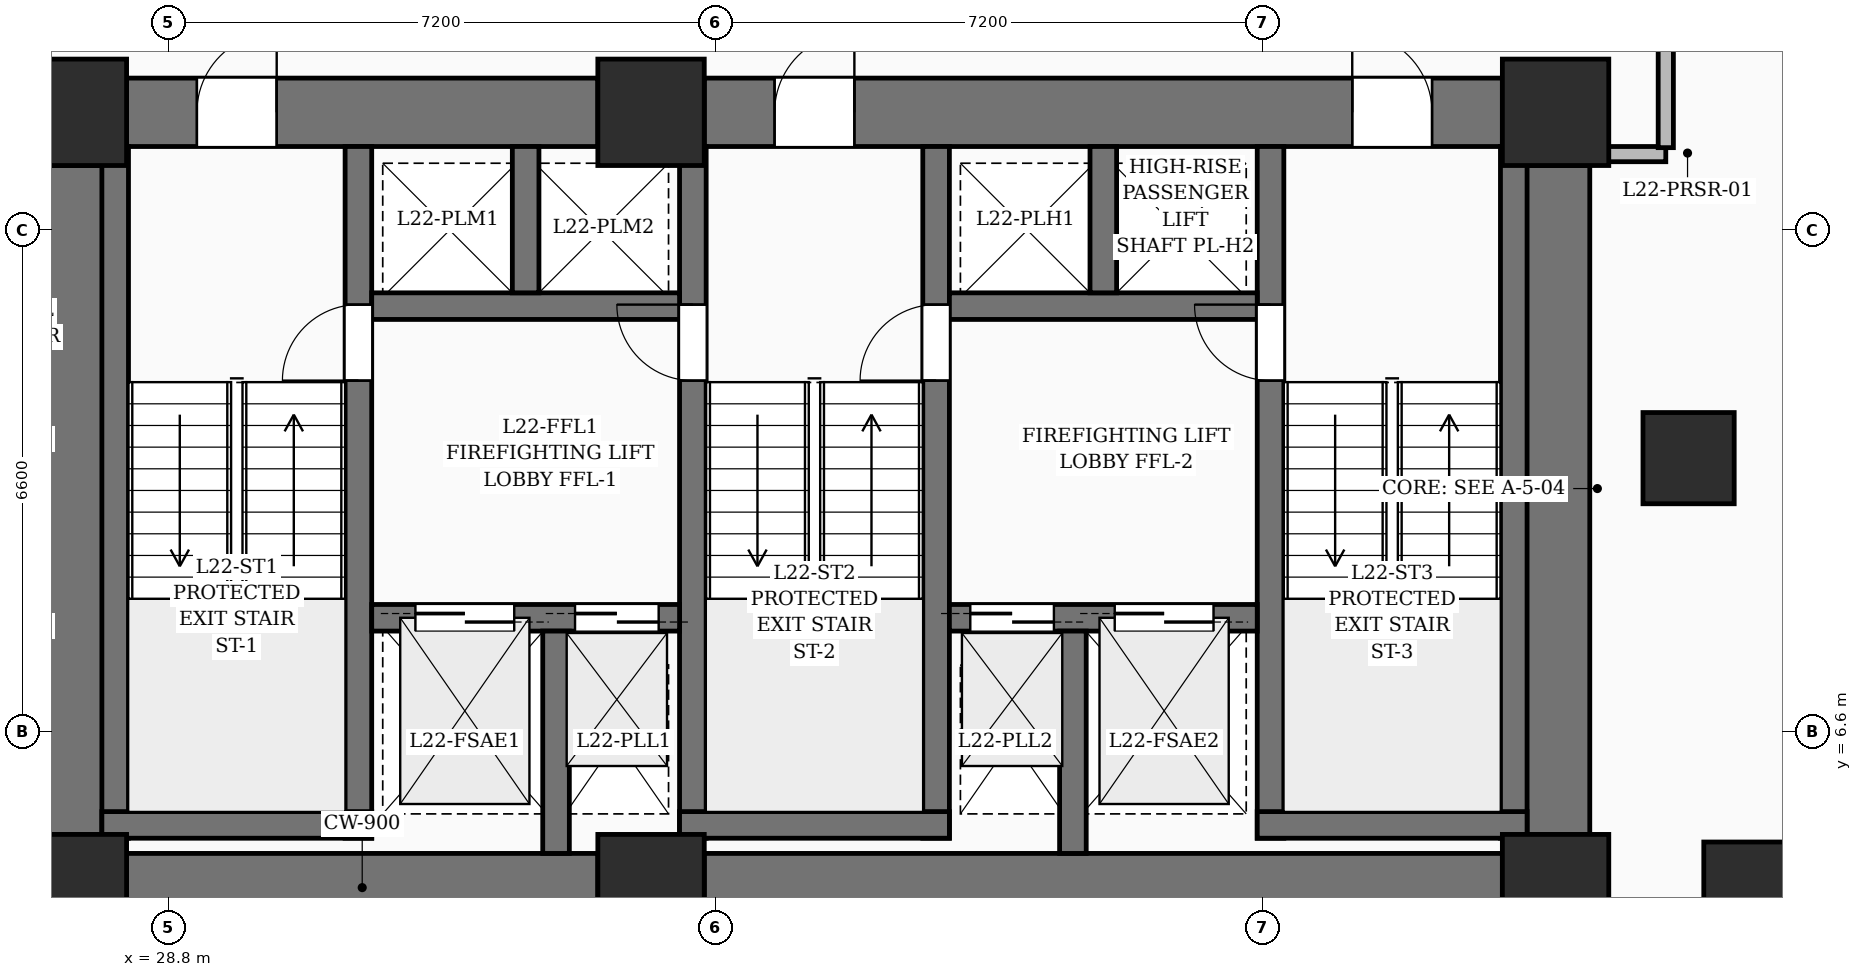
"""IFC4 building model, lengths in metres.
Left out: names, types, materials, properties, quantities, classifications, styles, units other than length and angle.
Written with IfcOpenShell. Run it as: python <this file> out.ifc"""

import sys

from ifc_helpers import new_model, si_unit, direction, frame, frame_2d, origin, origin_2d, place, context, subcontext, project, spatial, rectangle, extrude, element, fill, save


model = new_model("IFC4")
c1 = context("Model", 3, precision=1e-05, world=origin(), true_north=direction((0.0, 1.0)))
c2 = subcontext(c1, "Body", "Model", "MODEL_VIEW")
j1 = project(units=[si_unit("LENGTHUNIT", "METRE"), si_unit("PLANEANGLEUNIT", "RADIAN")], contexts=[c1])
p1 = place(None, origin())
s1 = spatial("IfcSite", under=j1, at=p1, CompositionType="ELEMENT")
p2 = place(p1, origin())
s2 = spatial("IfcBuilding", under=s1, at=p2, CompositionType="ELEMENT")
p3 = place(p2, frame((0.0, 0.0, 89.4)))
s3 = spatial("IfcBuildingStorey", under=s2, at=p3, CompositionType="ELEMENT", Elevation=89.4)
for number, where, z_axis, x_axis in (
    (1, (27.55, 4.55, 0.0), (0.0, 0.0, 1.0), (1.0, 0.0, 0.0)),
    (2, (35.15, 4.55, 0.0), (0.0, 0.0, 1.0), (1.0, 0.0, 0.0)),
    (3, (47.05, 4.55, 0.0), (0.0, 0.0, 1.0), (1.0, 0.0, 0.0)),
    (4, (27.55, 14.75, 0.0), (0.0, 0.0, 1.0), (1.0, 0.0, 0.0)),
    (5, (35.15, 14.75, 0.0), (0.0, 0.0, 1.0), (1.0, 0.0, 0.0)),
    (6, (47.05, 14.75, 0.0), (0.0, 0.0, 1.0), (1.0, 0.0, 0.0)),
):
    element("IfcColumn", number, at=place(p3, frame(where, z_axis=z_axis, x_axis=x_axis)), inside=s3, PredefinedType="COLUMN", context=c2, shape_type="SweptSolid", body=[
        extrude(rectangle(XDim=1.4, YDim=1.4, at=origin_2d()), origin(), (0.0, 0.0, 1.0), 3.6),
    ])
for number, where, z_axis, x_axis in (
    (7, (49.6, 4.55, 0.0), (0.0, 0.0, 1.0), (1.0, 0.0, 0.0)),
    (8, (48.8, 10.2, 0.0), (0.0, 0.0, 1.0), (1.0, 0.0, 0.0)),
):
    element("IfcColumn", number, at=place(p3, frame(where, z_axis=z_axis, x_axis=x_axis)), inside=s3, PredefinedType="COLUMN", context=c2, shape_type="SweptSolid", body=[
        extrude(rectangle(XDim=1.2, YDim=1.2, at=origin_2d()), origin(), (0.0, 0.0, 1.0), 3.6),
    ])
p4 = place(p3, frame((28.25, 4.55, 0.0), z_axis=(0.0, 0.0, 1.0), x_axis=(1.0, 0.0, 0.0)))
e9 = element("IfcWall", 9, at=p4, inside=s3, PredefinedType="SHEAR", context=c2, shape_type="SweptSolid", body=[
    extrude(rectangle(XDim=6.2, YDim=0.9, at=frame_2d((3.1, 0.0))), origin(), (0.0, 0.0, 1.0), 3.6),
])
p5 = place(p3, frame((35.85, 4.55, 0.0), z_axis=(0.0, 0.0, 1.0), x_axis=(1.0, 0.0, 0.0)))
e10 = element("IfcWall", 10, at=p5, inside=s3, PredefinedType="SHEAR", context=c2, shape_type="SweptSolid", body=[
    extrude(rectangle(XDim=10.5, YDim=0.9, at=frame_2d((5.25, 0.0))), origin(), (0.0, 0.0, 1.0), 3.6),
])
p6 = place(p3, frame((28.25, 14.75, 0.0), z_axis=(0.0, 0.0, 1.0), x_axis=(1.0, 0.0, 0.0)))
e11 = element("IfcWall", 11, at=p6, inside=s3, PredefinedType="SHEAR", context=c2, shape_type="SweptSolid", body=[
    extrude(rectangle(XDim=6.2, YDim=0.9, at=frame_2d((3.1, 0.0))), origin(), (0.0, 0.0, 1.0), 3.6),
])
p7 = place(p6, frame((0.925, 0.0, 0.0)))
e12 = element("IfcOpeningElement", 12, at=p7, cuts=e11, PredefinedType="OPENING", context=c2, shape_type="SweptSolid", body=[
    extrude(rectangle(XDim=1.05, YDim=2.15, at=frame_2d((0.525, 1.075))), frame((0.0, 0.46, 0.0), z_axis=(0.0, -1.0, 0.0), x_axis=(1.0, 0.0, 0.0)), (0.0, 0.0, 1.0), 0.92),
])
p8 = place(p3, frame((35.85, 14.75, 0.0), z_axis=(0.0, 0.0, 1.0), x_axis=(1.0, 0.0, 0.0)))
e13 = element("IfcWall", 13, at=p8, inside=s3, PredefinedType="SHEAR", context=c2, shape_type="SweptSolid", body=[
    extrude(rectangle(XDim=10.5, YDim=0.9, at=frame_2d((5.25, 0.0))), origin(), (0.0, 0.0, 1.0), 3.6),
])
p9 = place(p8, frame((0.925, 0.0, 0.0)))
e14 = element("IfcOpeningElement", 14, at=p9, cuts=e13, PredefinedType="OPENING", context=c2, shape_type="SweptSolid", body=[
    extrude(rectangle(XDim=1.05, YDim=2.15, at=frame_2d((0.525, 1.075))), frame((0.0, 0.46, 0.0), z_axis=(0.0, -1.0, 0.0), x_axis=(1.0, 0.0, 0.0)), (0.0, 0.0, 1.0), 0.92),
])
p10 = place(p8, frame((8.525, 0.0, 0.0)))
e15 = element("IfcOpeningElement", 15, at=p10, cuts=e13, PredefinedType="OPENING", context=c2, shape_type="SweptSolid", body=[
    extrude(rectangle(XDim=1.05, YDim=2.15, at=frame_2d((0.525, 1.075))), frame((0.0, 0.46, 0.0), z_axis=(0.0, -1.0, 0.0), x_axis=(1.0, 0.0, 0.0)), (0.0, 0.0, 1.0), 0.92),
])
for number, where, z_axis, x_axis in (
    (16, (27.55, 5.25, 0.0), (0.0, 0.0, 1.0), (0.0, 1.0, 0.0)),
    (17, (47.05, 5.25, 0.0), (0.0, 0.0, 1.0), (0.0, 1.0, 0.0)),
):
    element("IfcWall", number, at=place(p3, frame(where, z_axis=z_axis, x_axis=x_axis)), inside=s3, PredefinedType="SHEAR", context=c2, shape_type="SweptSolid", body=[
        extrude(rectangle(XDim=8.8, YDim=0.9, at=frame_2d((4.4, 0.0))), origin(), (0.0, 0.0, 1.0), 3.6),
    ])
p11 = place(p3, frame((28.1, 5.2, 0.0), z_axis=(0.0, 0.0, 1.0), x_axis=(0.0, 1.0, 0.0)))
e18 = element("IfcWall", 18, at=p11, inside=s3, PredefinedType="SOLIDWALL", context=c2, shape_type="SweptSolid", body=[
    extrude(rectangle(XDim=9.1, YDim=0.35, at=frame_2d((4.55, 0.0))), origin(), (0.0, 0.0, 1.0), 3.6),
])
p12 = place(p3, frame((31.3, 5.2, 0.0), z_axis=(0.0, 0.0, 1.0), x_axis=(0.0, 1.0, 0.0)))
e19 = element("IfcWall", 19, at=p12, inside=s3, PredefinedType="SOLIDWALL", context=c2, shape_type="SweptSolid", body=[
    extrude(rectangle(XDim=9.1, YDim=0.35, at=frame_2d((4.55, 0.0))), origin(), (0.0, 0.0, 1.0), 3.6),
])
p13 = place(p12, frame((6.02, 0.0, 0.0)))
e20 = element("IfcOpeningElement", 20, at=p13, cuts=e19, PredefinedType="OPENING", context=c2, shape_type="SweptSolid", body=[
    extrude(rectangle(XDim=1.0, YDim=2.15, at=frame_2d((0.5, 1.075))), frame((0.0, 0.185, 0.0), z_axis=(0.0, -1.0, 0.0), x_axis=(1.0, 0.0, 0.0)), (0.0, 0.0, 1.0), 0.37),
])
p14 = place(p3, frame((27.925, 5.375, 0.0), z_axis=(0.0, 0.0, 1.0), x_axis=(1.0, 0.0, 0.0)))
e21 = element("IfcWall", 21, at=p14, inside=s3, PredefinedType="SOLIDWALL", context=c2, shape_type="SweptSolid", body=[
    extrude(rectangle(XDim=3.55, YDim=0.35, at=frame_2d((1.775, 0.0))), origin(), (0.0, 0.0, 1.0), 3.6),
])
p15 = place(p3, frame((35.7, 5.2, 0.0), z_axis=(0.0, 0.0, 1.0), x_axis=(0.0, 1.0, 0.0)))
e22 = element("IfcWall", 22, at=p15, inside=s3, PredefinedType="SOLIDWALL", context=c2, shape_type="SweptSolid", body=[
    extrude(rectangle(XDim=9.1, YDim=0.35, at=frame_2d((4.55, 0.0))), origin(), (0.0, 0.0, 1.0), 3.6),
])
p16 = place(p15, frame((6.02, 0.0, 0.0)))
e23 = element("IfcOpeningElement", 23, at=p16, cuts=e22, PredefinedType="OPENING", context=c2, shape_type="SweptSolid", body=[
    extrude(rectangle(XDim=1.0, YDim=2.15, at=frame_2d((0.5, 1.075))), frame((0.0, 0.185, 0.0), z_axis=(0.0, -1.0, 0.0), x_axis=(1.0, 0.0, 0.0)), (0.0, 0.0, 1.0), 0.37),
])
p17 = place(p3, frame((38.9, 5.2, 0.0), z_axis=(0.0, 0.0, 1.0), x_axis=(0.0, 1.0, 0.0)))
e24 = element("IfcWall", 24, at=p17, inside=s3, PredefinedType="SOLIDWALL", context=c2, shape_type="SweptSolid", body=[
    extrude(rectangle(XDim=9.1, YDim=0.35, at=frame_2d((4.55, 0.0))), origin(), (0.0, 0.0, 1.0), 3.6),
])
p18 = place(p17, frame((6.02, 0.0, 0.0)))
e25 = element("IfcOpeningElement", 25, at=p18, cuts=e24, PredefinedType="OPENING", context=c2, shape_type="SweptSolid", body=[
    extrude(rectangle(XDim=1.0, YDim=2.15, at=frame_2d((0.5, 1.075))), frame((0.0, 0.185, 0.0), z_axis=(0.0, -1.0, 0.0), x_axis=(1.0, 0.0, 0.0)), (0.0, 0.0, 1.0), 0.37),
])
p19 = place(p3, frame((35.525, 5.375, 0.0), z_axis=(0.0, 0.0, 1.0), x_axis=(1.0, 0.0, 0.0)))
e26 = element("IfcWall", 26, at=p19, inside=s3, PredefinedType="SOLIDWALL", context=c2, shape_type="SweptSolid", body=[
    extrude(rectangle(XDim=3.55, YDim=0.35, at=frame_2d((1.775, 0.0))), origin(), (0.0, 0.0, 1.0), 3.6),
])
p20 = place(p3, frame((43.3, 5.2, 0.0), z_axis=(0.0, 0.0, 1.0), x_axis=(0.0, 1.0, 0.0)))
e27 = element("IfcWall", 27, at=p20, inside=s3, PredefinedType="SOLIDWALL", context=c2, shape_type="SweptSolid", body=[
    extrude(rectangle(XDim=9.1, YDim=0.35, at=frame_2d((4.55, 0.0))), origin(), (0.0, 0.0, 1.0), 3.6),
])
p21 = place(p20, frame((6.02, 0.0, 0.0)))
e28 = element("IfcOpeningElement", 28, at=p21, cuts=e27, PredefinedType="OPENING", context=c2, shape_type="SweptSolid", body=[
    extrude(rectangle(XDim=1.0, YDim=2.15, at=frame_2d((0.5, 1.075))), frame((0.0, 0.185, 0.0), z_axis=(0.0, -1.0, 0.0), x_axis=(1.0, 0.0, 0.0)), (0.0, 0.0, 1.0), 0.37),
])
p22 = place(p3, frame((46.5, 5.2, 0.0), z_axis=(0.0, 0.0, 1.0), x_axis=(0.0, 1.0, 0.0)))
e29 = element("IfcWall", 29, at=p22, inside=s3, PredefinedType="SOLIDWALL", context=c2, shape_type="SweptSolid", body=[
    extrude(rectangle(XDim=9.1, YDim=0.35, at=frame_2d((4.55, 0.0))), origin(), (0.0, 0.0, 1.0), 3.6),
])
p23 = place(p3, frame((43.125, 5.375, 0.0), z_axis=(0.0, 0.0, 1.0), x_axis=(1.0, 0.0, 0.0)))
e30 = element("IfcWall", 30, at=p23, inside=s3, PredefinedType="SOLIDWALL", context=c2, shape_type="SweptSolid", body=[
    extrude(rectangle(XDim=3.55, YDim=0.35, at=frame_2d((1.775, 0.0))), origin(), (0.0, 0.0, 1.0), 3.6),
])
p24 = place(p3, frame((31.475, 8.1, 0.0), z_axis=(0.0, 0.0, 1.0), x_axis=(1.0, 0.0, 0.0)))
e31 = element("IfcWall", 31, at=p24, inside=s3, PredefinedType="SOLIDWALL", context=c2, shape_type="SweptSolid", body=[
    extrude(rectangle(XDim=4.05, YDim=0.35, at=frame_2d((2.025, 0.0))), origin(), (0.0, 0.0, 1.0), 3.6),
])
p25 = place(p24, frame((0.575, 0.0, 0.0)))
e32 = element("IfcOpeningElement", 32, at=p25, cuts=e31, PredefinedType="OPENING", context=c2, shape_type="SweptSolid", body=[
    extrude(rectangle(XDim=1.3, YDim=2.25, at=frame_2d((0.65, 1.125))), frame((0.0, 0.185, 0.0), z_axis=(0.0, -1.0, 0.0), x_axis=(1.0, 0.0, 0.0)), (0.0, 0.0, 1.0), 0.37),
])
p26 = place(p24, frame((2.675, 0.0, 0.0)))
e33 = element("IfcOpeningElement", 33, at=p26, cuts=e31, PredefinedType="OPENING", context=c2, shape_type="SweptSolid", body=[
    extrude(rectangle(XDim=1.1, YDim=2.2, at=frame_2d((0.55, 1.1))), frame((0.0, 0.185, 0.0), z_axis=(0.0, -1.0, 0.0), x_axis=(1.0, 0.0, 0.0)), (0.0, 0.0, 1.0), 0.37),
])
p27 = place(p3, frame((39.075, 8.1, 0.0), z_axis=(0.0, 0.0, 1.0), x_axis=(1.0, 0.0, 0.0)))
e34 = element("IfcWall", 34, at=p27, inside=s3, PredefinedType="SOLIDWALL", context=c2, shape_type="SweptSolid", body=[
    extrude(rectangle(XDim=4.05, YDim=0.35, at=frame_2d((2.025, 0.0))), origin(), (0.0, 0.0, 1.0), 3.6),
])
p28 = place(p27, frame((2.175, 0.0, 0.0)))
e35 = element("IfcOpeningElement", 35, at=p28, cuts=e34, PredefinedType="OPENING", context=c2, shape_type="SweptSolid", body=[
    extrude(rectangle(XDim=1.3, YDim=2.25, at=frame_2d((0.65, 1.125))), frame((0.0, 0.185, 0.0), z_axis=(0.0, -1.0, 0.0), x_axis=(1.0, 0.0, 0.0)), (0.0, 0.0, 1.0), 0.37),
])
p29 = place(p27, frame((0.275, 0.0, 0.0)))
e36 = element("IfcOpeningElement", 36, at=p29, cuts=e34, PredefinedType="OPENING", context=c2, shape_type="SweptSolid", body=[
    extrude(rectangle(XDim=1.1, YDim=2.2, at=frame_2d((0.55, 1.1))), frame((0.0, 0.185, 0.0), z_axis=(0.0, -1.0, 0.0), x_axis=(1.0, 0.0, 0.0)), (0.0, 0.0, 1.0), 0.37),
])
for number, where, z_axis, x_axis in (
    (37, (33.9, 5.0, 0.0), (0.0, 0.0, 1.0), (0.0, 1.0, 0.0)),
    (38, (40.7, 5.0, 0.0), (0.0, 0.0, 1.0), (0.0, 1.0, 0.0)),
):
    element("IfcWall", number, at=place(p3, frame(where, z_axis=z_axis, x_axis=x_axis)), inside=s3, PredefinedType="SOLIDWALL", context=c2, shape_type="SweptSolid", body=[
        extrude(rectangle(XDim=2.925, YDim=0.35, at=frame_2d((1.462, 0.0))), origin(), (0.0, 0.0, 1.0), 3.6),
    ])
p30 = place(p3, frame((31.475, 12.2, 0.0), z_axis=(0.0, 0.0, 1.0), x_axis=(1.0, 0.0, 0.0)))
e39 = element("IfcWall", 39, at=p30, inside=s3, PredefinedType="SOLIDWALL", context=c2, shape_type="SweptSolid", body=[
    extrude(rectangle(XDim=4.05, YDim=0.35, at=frame_2d((2.025, 0.0))), origin(), (0.0, 0.0, 1.0), 3.6),
])
p31 = place(p3, frame((33.5, 12.375, 0.0), z_axis=(0.0, 0.0, 1.0), x_axis=(0.0, 1.0, 0.0)))
e40 = element("IfcWall", 40, at=p31, inside=s3, PredefinedType="SOLIDWALL", context=c2, shape_type="SweptSolid", body=[
    extrude(rectangle(XDim=1.925, YDim=0.35, at=frame_2d((0.962, 0.0))), origin(), (0.0, 0.0, 1.0), 3.6),
])
p32 = place(p3, frame((39.075, 12.2, 0.0), z_axis=(0.0, 0.0, 1.0), x_axis=(1.0, 0.0, 0.0)))
e41 = element("IfcWall", 41, at=p32, inside=s3, PredefinedType="SOLIDWALL", context=c2, shape_type="SweptSolid", body=[
    extrude(rectangle(XDim=4.05, YDim=0.35, at=frame_2d((2.025, 0.0))), origin(), (0.0, 0.0, 1.0), 3.6),
])
p33 = place(p3, frame((41.1, 12.375, 0.0), z_axis=(0.0, 0.0, 1.0), x_axis=(0.0, 1.0, 0.0)))
e42 = element("IfcWall", 42, at=p33, inside=s3, PredefinedType="SOLIDWALL", context=c2, shape_type="SweptSolid", body=[
    extrude(rectangle(XDim=1.925, YDim=0.35, at=frame_2d((0.962, 0.0))), origin(), (0.0, 0.0, 1.0), 3.6),
])
p34 = place(p3, frame((47.5, 14.2, 0.0), z_axis=(0.0, 0.0, 1.0), x_axis=(1.0, 0.0, 0.0)))
e43 = element("IfcWall", 43, at=p34, inside=s3, PredefinedType="PARTITIONING", context=c2, shape_type="SweptSolid", body=[
    extrude(rectangle(XDim=1.0, YDim=0.2, at=frame_2d((0.5, 0.0))), origin(), (0.0, 0.0, 1.0), 3.35),
])
p35 = place(p3, frame((48.5, 14.285, 0.0), z_axis=(0.0, 0.0, 1.0), x_axis=(0.0, 1.0, 0.0)))
e44 = element("IfcWall", 44, at=p35, inside=s3, PredefinedType="PARTITIONING", context=c2, shape_type="SweptSolid", body=[
    extrude(rectangle(XDim=2.735, YDim=0.2, at=frame_2d((1.368, 0.0))), origin(), (0.0, 0.0, 1.0), 2.345),
])
p36 = place(p7, origin())
e45 = element("IfcDoor", 45, at=p36, inside=s3, OperationType="SINGLE_SWING_RIGHT", PredefinedType="DOOR", context=c2, shape_type="SweptSolid", body=[
    extrude(rectangle(XDim=1.05, YDim=2.15, at=frame_2d((0.525, 1.075))), frame((0.0, 0.025, 0.0), z_axis=(0.0, -1.0, 0.0), x_axis=(1.0, 0.0, 0.0)), (0.0, 0.0, 1.0), 0.05),
])
fill(e12, e45)
p37 = place(p9, origin())
e46 = element("IfcDoor", 46, at=p37, inside=s3, OperationType="SINGLE_SWING_RIGHT", PredefinedType="DOOR", context=c2, shape_type="SweptSolid", body=[
    extrude(rectangle(XDim=1.05, YDim=2.15, at=frame_2d((0.525, 1.075))), frame((0.0, 0.025, 0.0), z_axis=(0.0, -1.0, 0.0), x_axis=(1.0, 0.0, 0.0)), (0.0, 0.0, 1.0), 0.05),
])
fill(e14, e46)
p38 = place(p10, origin())
e47 = element("IfcDoor", 47, at=p38, inside=s3, OperationType="SINGLE_SWING_LEFT", PredefinedType="DOOR", context=c2, shape_type="SweptSolid", body=[
    extrude(rectangle(XDim=1.05, YDim=2.15, at=frame_2d((0.525, 1.075))), frame((0.0, 0.025, 0.0), z_axis=(0.0, -1.0, 0.0), x_axis=(1.0, 0.0, 0.0)), (0.0, 0.0, 1.0), 0.05),
])
fill(e15, e47)
p39 = place(p13, origin())
e48 = element("IfcDoor", 48, at=p39, inside=s3, OperationType="SINGLE_SWING_LEFT", PredefinedType="DOOR", context=c2, shape_type="SweptSolid", body=[
    extrude(rectangle(XDim=1.0, YDim=2.15, at=frame_2d((0.5, 1.075))), frame((0.0, 0.025, 0.0), z_axis=(0.0, -1.0, 0.0), x_axis=(1.0, 0.0, 0.0)), (0.0, 0.0, 1.0), 0.05),
])
fill(e20, e48)
p40 = place(p16, origin())
e49 = element("IfcDoor", 49, at=p40, inside=s3, OperationType="SINGLE_SWING_RIGHT", PredefinedType="DOOR", context=c2, shape_type="SweptSolid", body=[
    extrude(rectangle(XDim=1.0, YDim=2.15, at=frame_2d((0.5, 1.075))), frame((0.0, 0.025, 0.0), z_axis=(0.0, -1.0, 0.0), x_axis=(1.0, 0.0, 0.0)), (0.0, 0.0, 1.0), 0.05),
])
fill(e23, e49)
p41 = place(p18, origin())
e50 = element("IfcDoor", 50, at=p41, inside=s3, OperationType="SINGLE_SWING_LEFT", PredefinedType="DOOR", context=c2, shape_type="SweptSolid", body=[
    extrude(rectangle(XDim=1.0, YDim=2.15, at=frame_2d((0.5, 1.075))), frame((0.0, 0.025, 0.0), z_axis=(0.0, -1.0, 0.0), x_axis=(1.0, 0.0, 0.0)), (0.0, 0.0, 1.0), 0.05),
])
fill(e25, e50)
p42 = place(p21, origin())
e51 = element("IfcDoor", 51, at=p42, inside=s3, OperationType="SINGLE_SWING_RIGHT", PredefinedType="DOOR", context=c2, shape_type="SweptSolid", body=[
    extrude(rectangle(XDim=1.0, YDim=2.15, at=frame_2d((0.5, 1.075))), frame((0.0, 0.025, 0.0), z_axis=(0.0, -1.0, 0.0), x_axis=(1.0, 0.0, 0.0)), (0.0, 0.0, 1.0), 0.05),
])
fill(e28, e51)
p43 = place(p25, origin())
e52 = element("IfcDoor", 52, at=p43, inside=s3, OperationType="DOUBLE_DOOR_SLIDING", PredefinedType="DOOR", context=c2, shape_type="SweptSolid", body=[
    extrude(rectangle(XDim=1.3, YDim=2.25, at=frame_2d((0.65, 1.125))), frame((0.0, 0.025, 0.0), z_axis=(0.0, -1.0, 0.0), x_axis=(1.0, 0.0, 0.0)), (0.0, 0.0, 1.0), 0.05),
])
fill(e32, e52)
p44 = place(p28, origin())
e53 = element("IfcDoor", 53, at=p44, inside=s3, OperationType="DOUBLE_DOOR_SLIDING", PredefinedType="DOOR", context=c2, shape_type="SweptSolid", body=[
    extrude(rectangle(XDim=1.3, YDim=2.25, at=frame_2d((0.65, 1.125))), frame((0.0, 0.025, 0.0), z_axis=(0.0, -1.0, 0.0), x_axis=(1.0, 0.0, 0.0)), (0.0, 0.0, 1.0), 0.05),
])
fill(e35, e53)
p45 = place(p26, origin())
e54 = element("IfcDoor", 54, at=p45, inside=s3, OperationType="DOUBLE_DOOR_SLIDING", PredefinedType="DOOR", context=c2, shape_type="SweptSolid", body=[
    extrude(rectangle(XDim=1.1, YDim=2.2, at=frame_2d((0.55, 1.1))), frame((0.0, 0.025, 0.0), z_axis=(0.0, -1.0, 0.0), x_axis=(1.0, 0.0, 0.0)), (0.0, 0.0, 1.0), 0.05),
])
fill(e33, e54)
p46 = place(p29, origin())
e55 = element("IfcDoor", 55, at=p46, inside=s3, OperationType="DOUBLE_DOOR_SLIDING", PredefinedType="DOOR", context=c2, shape_type="SweptSolid", body=[
    extrude(rectangle(XDim=1.1, YDim=2.2, at=frame_2d((0.55, 1.1))), frame((0.0, 0.025, 0.0), z_axis=(0.0, -1.0, 0.0), x_axis=(1.0, 0.0, 0.0)), (0.0, 0.0, 1.0), 0.05),
])
fill(e36, e55)
save(model, sys.argv[1])
